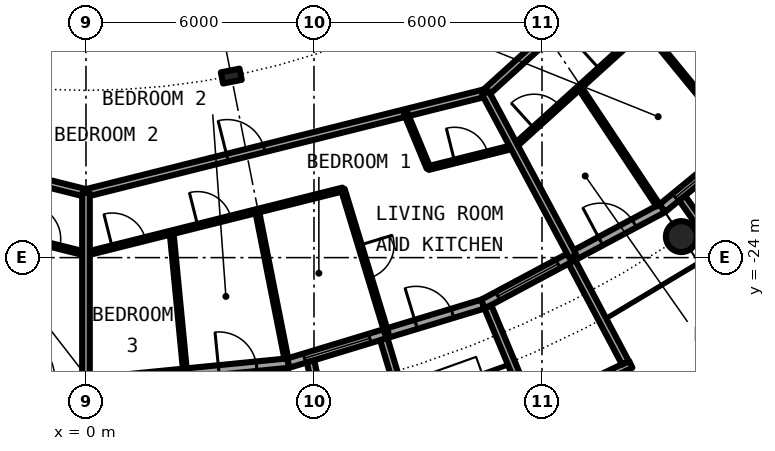
"""IFC4 building model, lengths in metres.
Left out: names, types, materials, properties, quantities, classifications, styles, units other than length and angle.
Written with IfcOpenShell. Run it as: python <this file> out.ifc"""

import sys

from ifc_helpers import new_model, si_unit, direction, frame, frame_2d, origin, origin_2d, place, context, subcontext, project, spatial, rectangle, circle, hollow_circle, i_section, extrude, element, fill, save


model = new_model("IFC4")
c1 = context("Model", 3, precision=1e-05, world=origin(), true_north=direction((0.0, 1.0)))
c2 = subcontext(c1, "Body", "Model", "MODEL_VIEW")
j1 = project(units=[si_unit("LENGTHUNIT", "METRE"), si_unit("PLANEANGLEUNIT", "RADIAN")], contexts=[c1])
p1 = place(None, origin())
s1 = spatial("IfcSite", under=j1, at=p1, CompositionType="ELEMENT")
p2 = place(p1, origin())
s2 = spatial("IfcBuilding", under=s1, at=p2, CompositionType="ELEMENT")
p3 = place(p2, frame((0.0, 0.0, 161.6)))
s3 = spatial("IfcBuildingStorey", under=s2, at=p3, CompositionType="ELEMENT", Elevation=161.6)
p4 = place(p3, frame((15.667, -23.448, 0.0), z_axis=(0.0, 0.0, 1.0), x_axis=(1.0, 0.0, 0.0)))
e1 = element("IfcColumn", 1, at=p4, inside=s3, PredefinedType="COLUMN", context=c2, shape_type="SweptSolid", body=[
    extrude(hollow_circle(Radius=0.406, WallThickness=0.04, at=origin_2d()), origin(), (0.0, 0.0, 1.0), 3.05),
])
p5 = place(p3, frame((3.824, -19.223, 0.0), z_axis=(0.0, 0.0, 1.0), x_axis=(0.195090322016, -0.980785280403, 0.0)))
e2 = element("IfcColumn", 2, at=p5, inside=s3, PredefinedType="COLUMN", context=c2, shape_type="SweptSolid", body=[
    extrude(i_section(OverallWidth=0.3, OverallDepth=0.5, WebThickness=0.014, FlangeThickness=0.028, FilletRadius=0.027, at=origin_2d()), origin(), (0.0, 0.0, 1.0), 3.05),
])
p6 = place(p3, frame((-5.326, -26.775, 0.0), z_axis=(0.0, 0.0, 1.0), x_axis=(0.995173996315, -0.098126026407, 0.0)))
e3 = element("IfcWall", 3, at=p6, inside=s3, PredefinedType="SOLIDWALL", context=c2, shape_type="SweptSolid", body=[
    extrude(rectangle(XDim=5.352, YDim=0.25, at=frame_2d((2.676, 0.0))), origin(), (0.0, 0.0, 1.0), 2.7),
])
p7 = place(p6, frame((0.441, 0.0, 0.3)))
e4 = element("IfcOpeningElement", 4, at=p7, cuts=e3, PredefinedType="OPENING", context=c2, shape_type="SweptSolid", body=[
    extrude(rectangle(XDim=1.8, YDim=2.1, at=frame_2d((0.9, 1.05))), frame((0.0, 0.135, 0.0), z_axis=(0.0, -1.0, 0.0), x_axis=(1.0, 0.0, 0.0)), (0.0, 0.0, 1.0), 0.27),
])
p8 = place(p6, frame((3.51, 0.0, 0.0)))
e5 = element("IfcOpeningElement", 5, at=p8, cuts=e3, PredefinedType="OPENING", context=c2, shape_type="SweptSolid", body=[
    extrude(rectangle(XDim=1.0, YDim=2.2, at=frame_2d((0.5, 1.1))), frame((0.0, 0.135, 0.0), z_axis=(0.0, -1.0, 0.0), x_axis=(1.0, 0.0, 0.0)), (0.0, 0.0, 1.0), 0.27),
])
p9 = place(p3, frame((0.0, -27.3, 0.0), z_axis=(0.0, 0.0, 1.0), x_axis=(0.995173996315, 0.098126026407, 0.0)))
e6 = element("IfcWall", 6, at=p9, inside=s3, PredefinedType="SOLIDWALL", context=c2, shape_type="SweptSolid", body=[
    extrude(rectangle(XDim=5.352, YDim=0.25, at=frame_2d((2.676, 0.0))), origin(), (0.0, 0.0, 1.0), 2.7),
])
p10 = place(p9, frame((0.441, 0.0, 0.3)))
e7 = element("IfcOpeningElement", 7, at=p10, cuts=e6, PredefinedType="OPENING", context=c2, shape_type="SweptSolid", body=[
    extrude(rectangle(XDim=1.8, YDim=2.1, at=frame_2d((0.9, 1.05))), frame((0.0, 0.135, 0.0), z_axis=(0.0, -1.0, 0.0), x_axis=(1.0, 0.0, 0.0)), (0.0, 0.0, 1.0), 0.27),
])
p11 = place(p9, frame((3.51, 0.0, 0.0)))
e8 = element("IfcOpeningElement", 8, at=p11, cuts=e6, PredefinedType="OPENING", context=c2, shape_type="SweptSolid", body=[
    extrude(rectangle(XDim=1.0, YDim=2.2, at=frame_2d((0.5, 1.1))), frame((0.0, 0.135, 0.0), z_axis=(0.0, -1.0, 0.0), x_axis=(1.0, 0.0, 0.0)), (0.0, 0.0, 1.0), 0.27),
])
p12 = place(p3, frame((5.326, -26.775, 0.0), z_axis=(0.0, 0.0, 1.0), x_axis=(0.956965678721, 0.290201119486, 0.0)))
e9 = element("IfcWall", 9, at=p12, inside=s3, PredefinedType="SOLIDWALL", context=c2, shape_type="SweptSolid", body=[
    extrude(rectangle(XDim=5.351, YDim=0.25, at=frame_2d((2.676, 0.0))), origin(), (0.0, 0.0, 1.0), 2.7),
])
p13 = place(p12, frame((0.441, 0.0, 0.3)))
e10 = element("IfcOpeningElement", 10, at=p13, cuts=e9, PredefinedType="OPENING", context=c2, shape_type="SweptSolid", body=[
    extrude(rectangle(XDim=1.8, YDim=2.1, at=frame_2d((0.9, 1.05))), frame((0.0, 0.135, 0.0), z_axis=(0.0, -1.0, 0.0), x_axis=(1.0, 0.0, 0.0)), (0.0, 0.0, 1.0), 0.27),
])
p14 = place(p12, frame((3.51, 0.0, 0.0)))
e11 = element("IfcOpeningElement", 11, at=p14, cuts=e9, PredefinedType="OPENING", context=c2, shape_type="SweptSolid", body=[
    extrude(rectangle(XDim=1.0, YDim=2.2, at=frame_2d((0.5, 1.1))), frame((0.0, 0.135, 0.0), z_axis=(0.0, -1.0, 0.0), x_axis=(1.0, 0.0, 0.0)), (0.0, 0.0, 1.0), 0.27),
])
p15 = place(p3, frame((5.909, -26.729, -0.03), z_axis=(0.0, 0.0, 1.0), x_axis=(0.216409053917, -0.976302781612, 0.0)))
e12 = element("IfcWall", 12, at=p15, inside=s3, PredefinedType="SOLIDWALL", context=c2, shape_type="SweptSolid", body=[
    extrude(rectangle(XDim=2.925, YDim=0.2, at=frame_2d((1.463, 0.0))), origin(), (0.0, 0.0, 1.0), 2.73),
])
p16 = place(p3, frame((7.837, -26.144, -0.03), z_axis=(0.0, 0.0, 1.0), x_axis=(0.287064767992, -0.957911174889, 0.0)))
e13 = element("IfcWall", 13, at=p16, inside=s3, PredefinedType="SOLIDWALL", context=c2, shape_type="SweptSolid", body=[
    extrude(rectangle(XDim=3.006, YDim=0.2, at=frame_2d((1.503, 0.0))), origin(), (0.0, 0.0, 1.0), 2.73),
])
p17 = place(p3, frame((10.447, -25.222, 0.0), z_axis=(0.0, 0.0, 1.0), x_axis=(0.881915646801, 0.471407246368, 0.0)))
e14 = element("IfcWall", 14, at=p17, inside=s3, PredefinedType="SOLIDWALL", context=c2, shape_type="SweptSolid", body=[
    extrude(rectangle(XDim=5.352, YDim=0.25, at=frame_2d((2.676, 0.0))), origin(), (0.0, 0.0, 1.0), 2.7),
])
p18 = place(p17, frame((0.441, 0.0, 0.3)))
e15 = element("IfcOpeningElement", 15, at=p18, cuts=e14, PredefinedType="OPENING", context=c2, shape_type="SweptSolid", body=[
    extrude(rectangle(XDim=1.8, YDim=2.1, at=frame_2d((0.9, 1.05))), frame((0.0, 0.135, 0.0), z_axis=(0.0, -1.0, 0.0), x_axis=(1.0, 0.0, 0.0)), (0.0, 0.0, 1.0), 0.27),
])
p19 = place(p17, frame((3.51, 0.0, 0.0)))
e16 = element("IfcOpeningElement", 16, at=p19, cuts=e14, PredefinedType="OPENING", context=c2, shape_type="SweptSolid", body=[
    extrude(rectangle(XDim=1.0, YDim=2.2, at=frame_2d((0.5, 1.1))), frame((0.0, 0.135, 0.0), z_axis=(0.0, -1.0, 0.0), x_axis=(1.0, 0.0, 0.0)), (0.0, 0.0, 1.0), 0.27),
])
p20 = place(p3, frame((11.629, -28.088, -0.03), z_axis=(0.0, 0.0, 1.0), x_axis=(0.904000060331, 0.427532327342, 0.0)))
e17 = element("IfcWall", 17, at=p20, inside=s3, PredefinedType="SOLIDWALL", context=c2, shape_type="SweptSolid", body=[
    extrude(rectangle(XDim=2.993, YDim=0.2, at=frame_2d((1.497, 0.0))), origin(), (0.0, 0.0, 1.0), 2.73),
])
p21 = place(p20, frame((0.457, 0.0, 0.33)))
e18 = element("IfcOpeningElement", 18, at=p21, cuts=e17, PredefinedType="OPENING", context=c2, shape_type="SweptSolid", body=[
    extrude(circle(Radius=1.04, at=frame_2d((1.04, 1.04))), frame((0.0, 0.11, 0.0), z_axis=(0.0, -1.0, 0.0), x_axis=(1.0, 0.0, 0.0)), (0.0, 0.0, 1.0), 0.22),
])
p22 = place(p3, frame((10.575, -25.295, -0.03), z_axis=(0.0, 0.0, 1.0), x_axis=(0.385697364644, -0.922625353492, 0.0)))
e19 = element("IfcWall", 19, at=p22, inside=s3, PredefinedType="SOLIDWALL", context=c2, shape_type="SweptSolid", body=[
    extrude(rectangle(XDim=2.883, YDim=0.2, at=frame_2d((1.442, 0.0))), origin(), (0.0, 0.0, 1.0), 2.73),
])
p23 = place(p3, frame((12.787, -24.113, -0.03), z_axis=(0.0, 0.0, 1.0), x_axis=(0.468365282436, -0.883534924159, 0.0)))
e20 = element("IfcWall", 20, at=p23, inside=s3, PredefinedType="SOLIDWALL", context=c2, shape_type="SweptSolid", body=[
    extrude(rectangle(XDim=3.006, YDim=0.2, at=frame_2d((1.503, 0.0))), origin(), (0.0, 0.0, 1.0), 2.73),
])
p24 = place(p3, frame((15.167, -22.699, 0.0), z_axis=(0.0, 0.0, 1.0), x_axis=(0.773019449054, 0.634382322723, 0.0)))
e21 = element("IfcWall", 21, at=p24, inside=s3, PredefinedType="SOLIDWALL", context=c2, shape_type="SweptSolid", body=[
    extrude(rectangle(XDim=5.352, YDim=0.25, at=frame_2d((2.676, 0.0))), origin(), (0.0, 0.0, 1.0), 2.7),
])
p25 = place(p24, frame((0.441, 0.0, 0.3)))
e22 = element("IfcOpeningElement", 22, at=p25, cuts=e21, PredefinedType="OPENING", context=c2, shape_type="SweptSolid", body=[
    extrude(rectangle(XDim=1.8, YDim=2.1, at=frame_2d((0.9, 1.05))), frame((0.0, 0.135, 0.0), z_axis=(0.0, -1.0, 0.0), x_axis=(1.0, 0.0, 0.0)), (0.0, 0.0, 1.0), 0.27),
])
p26 = place(p24, frame((3.51, 0.0, 0.0)))
e23 = element("IfcOpeningElement", 23, at=p26, cuts=e21, PredefinedType="OPENING", context=c2, shape_type="SweptSolid", body=[
    extrude(rectangle(XDim=1.0, YDim=2.2, at=frame_2d((0.5, 1.1))), frame((0.0, 0.135, 0.0), z_axis=(0.0, -1.0, 0.0), x_axis=(1.0, 0.0, 0.0)), (0.0, 0.0, 1.0), 0.27),
])
p27 = place(p3, frame((15.688, -22.433, -0.03), z_axis=(0.0, 0.0, 1.0), x_axis=(0.573260687834, -0.819373043115, 0.0)))
e24 = element("IfcWall", 24, at=p27, inside=s3, PredefinedType="SOLIDWALL", context=c2, shape_type="SweptSolid", body=[
    extrude(rectangle(XDim=2.925, YDim=0.2, at=frame_2d((1.463, 0.0))), origin(), (0.0, 0.0, 1.0), 2.73),
])
p28 = place(p3, frame((-6.762, -22.206, 0.0), z_axis=(0.0, 0.0, 1.0), x_axis=(0.97002908491, -0.242988836015, 0.0)))
e25 = element("IfcWall", 25, at=p28, inside=s3, PredefinedType="PARTITIONING", context=c2, shape_type="SweptSolid", body=[
    extrude(rectangle(XDim=6.971, YDim=0.1, at=frame_2d((3.485, 0.0))), origin(), (0.0, 0.0, 1.0), 2.7),
])
p29 = place(p28, frame((3.039, 0.0, 0.0)))
e26 = element("IfcOpeningElement", 26, at=p29, cuts=e25, PredefinedType="OPENING", context=c2, shape_type="SweptSolid", body=[
    extrude(rectangle(XDim=0.9, YDim=2.3, at=frame_2d((0.45, 1.15))), frame((0.0, 0.06, 0.0), z_axis=(0.0, -1.0, 0.0), x_axis=(1.0, 0.0, 0.0)), (0.0, 0.0, 1.0), 0.12),
])
p30 = place(p28, frame((5.358, 0.0, 0.0)))
e27 = element("IfcOpeningElement", 27, at=p30, cuts=e25, PredefinedType="OPENING", context=c2, shape_type="SweptSolid", body=[
    extrude(rectangle(XDim=0.9, YDim=2.3, at=frame_2d((0.45, 1.15))), frame((0.0, 0.06, 0.0), z_axis=(0.0, -1.0, 0.0), x_axis=(1.0, 0.0, 0.0)), (0.0, 0.0, 1.0), 0.12),
])
p31 = place(p3, frame((0.0, -23.9, 0.0), z_axis=(0.0, 0.0, 1.0), x_axis=(0.97002908491, 0.242988836015, 0.0)))
e28 = element("IfcWall", 28, at=p31, inside=s3, PredefinedType="PARTITIONING", context=c2, shape_type="SweptSolid", body=[
    extrude(rectangle(XDim=6.971, YDim=0.1, at=frame_2d((3.485, 0.0))), origin(), (0.0, 0.0, 1.0), 2.7),
])
p32 = place(p31, frame((3.032, 0.0, 0.0)))
e29 = element("IfcOpeningElement", 29, at=p32, cuts=e28, PredefinedType="OPENING", context=c2, shape_type="SweptSolid", body=[
    extrude(rectangle(XDim=0.9, YDim=2.3, at=frame_2d((0.45, 1.15))), frame((0.0, 0.06, 0.0), z_axis=(0.0, -1.0, 0.0), x_axis=(1.0, 0.0, 0.0)), (0.0, 0.0, 1.0), 0.12),
])
p33 = place(p31, frame((0.712, 0.0, 0.0)))
e30 = element("IfcOpeningElement", 30, at=p33, cuts=e28, PredefinedType="OPENING", context=c2, shape_type="SweptSolid", body=[
    extrude(rectangle(XDim=0.9, YDim=2.3, at=frame_2d((0.45, 1.15))), frame((0.0, 0.06, 0.0), z_axis=(0.0, -1.0, 0.0), x_axis=(1.0, 0.0, 0.0)), (0.0, 0.0, 1.0), 0.12),
])
p34 = place(p3, frame((9.012, -21.643, 0.0), z_axis=(0.0, 0.0, 1.0), x_axis=(0.970025067561, 0.243004873001, 0.0)))
e31 = element("IfcWall", 31, at=p34, inside=s3, PredefinedType="PARTITIONING", context=c2, shape_type="SweptSolid", body=[
    extrude(rectangle(XDim=2.326, YDim=0.1, at=frame_2d((1.163, 0.0))), origin(), (0.0, 0.0, 1.0), 2.7),
])
p35 = place(p34, frame((0.71, 0.0, 0.0)))
e32 = element("IfcOpeningElement", 32, at=p35, cuts=e31, PredefinedType="OPENING", context=c2, shape_type="SweptSolid", body=[
    extrude(rectangle(XDim=0.9, YDim=2.3, at=frame_2d((0.45, 1.15))), frame((0.0, 0.06, 0.0), z_axis=(0.0, -1.0, 0.0), x_axis=(1.0, 0.0, 0.0)), (0.0, 0.0, 1.0), 0.12),
])
p36 = place(p3, frame((11.266, -21.078, 0.0), z_axis=(0.0, 0.0, 1.0), x_axis=(0.74114118713, 0.671349194339, 0.0)))
e33 = element("IfcWall", 33, at=p36, inside=s3, PredefinedType="PARTITIONING", context=c2, shape_type="SweptSolid", body=[
    extrude(rectangle(XDim=6.965, YDim=0.1, at=frame_2d((3.482, 0.0))), origin(), (0.0, 0.0, 1.0), 2.7),
])
p37 = place(p36, frame((3.034, 0.0, 0.0)))
e34 = element("IfcOpeningElement", 34, at=p37, cuts=e33, PredefinedType="OPENING", context=c2, shape_type="SweptSolid", body=[
    extrude(rectangle(XDim=0.9, YDim=2.3, at=frame_2d((0.45, 1.15))), frame((0.0, 0.06, 0.0), z_axis=(0.0, -1.0, 0.0), x_axis=(1.0, 0.0, 0.0)), (0.0, 0.0, 1.0), 0.12),
])
p38 = place(p36, frame((0.712, 0.0, 0.0)))
e35 = element("IfcOpeningElement", 35, at=p38, cuts=e33, PredefinedType="OPENING", context=c2, shape_type="SweptSolid", body=[
    extrude(rectangle(XDim=0.9, YDim=2.3, at=frame_2d((0.45, 1.15))), frame((0.0, 0.06, 0.0), z_axis=(0.0, -1.0, 0.0), x_axis=(1.0, 0.0, 0.0)), (0.0, 0.0, 1.0), 0.12),
])
p39 = place(p3, frame((-10.518, -19.665, 0.0), z_axis=(0.0, 0.0, 1.0), x_axis=(0.970023181991, -0.243012399685, 0.0)))
e36 = element("IfcWall", 36, at=p39, inside=s3, PredefinedType="PARTITIONING", context=c2, shape_type="SweptSolid", body=[
    extrude(rectangle(XDim=10.843, YDim=0.2, at=frame_2d((5.421, 0.0))), origin(), (0.0, 0.0, 1.0), 2.7),
])
p40 = place(p39, frame((6.008, 0.0, 0.0)))
e37 = element("IfcOpeningElement", 37, at=p40, cuts=e36, PredefinedType="OPENING", context=c2, shape_type="SweptSolid", body=[
    extrude(rectangle(XDim=1.0, YDim=2.3, at=frame_2d((0.5, 1.15))), frame((0.0, 0.11, 0.0), z_axis=(0.0, -1.0, 0.0), x_axis=(1.0, 0.0, 0.0)), (0.0, 0.0, 1.0), 0.22),
])
p41 = place(p3, frame((0.0, -22.3, 0.0), z_axis=(0.0, 0.0, 1.0), x_axis=(0.970023181991, 0.243012399685, 0.0)))
e38 = element("IfcWall", 38, at=p41, inside=s3, PredefinedType="PARTITIONING", context=c2, shape_type="SweptSolid", body=[
    extrude(rectangle(XDim=10.843, YDim=0.2, at=frame_2d((5.421, 0.0))), origin(), (0.0, 0.0, 1.0), 2.7),
])
p42 = place(p41, frame((3.835, 0.0, 0.0)))
e39 = element("IfcOpeningElement", 39, at=p42, cuts=e38, PredefinedType="OPENING", context=c2, shape_type="SweptSolid", body=[
    extrude(rectangle(XDim=1.0, YDim=2.3, at=frame_2d((0.5, 1.15))), frame((0.0, 0.11, 0.0), z_axis=(0.0, -1.0, 0.0), x_axis=(1.0, 0.0, 0.0)), (0.0, 0.0, 1.0), 0.22),
])
p43 = place(p3, frame((10.512, -19.667, 0.0), z_axis=(0.0, 0.0, 1.0), x_axis=(0.740947367223, 0.671563101283, 0.0)))
e40 = element("IfcWall", 40, at=p43, inside=s3, PredefinedType="PARTITIONING", context=c2, shape_type="SweptSolid", body=[
    extrude(rectangle(XDim=10.837, YDim=0.2, at=frame_2d((5.419, 0.0))), origin(), (0.0, 0.0, 1.0), 2.7),
])
p44 = place(p43, frame((3.835, 0.0, 0.0)))
e41 = element("IfcOpeningElement", 41, at=p44, cuts=e40, PredefinedType="OPENING", context=c2, shape_type="SweptSolid", body=[
    extrude(rectangle(XDim=1.0, YDim=2.3, at=frame_2d((0.5, 1.15))), frame((0.0, 0.11, 0.0), z_axis=(0.0, -1.0, 0.0), x_axis=(1.0, 0.0, 0.0)), (0.0, 0.0, 1.0), 0.22),
])
p45 = place(p3, frame((0.0, -27.175, 0.0), z_axis=(0.0, 0.0, 1.0), x_axis=(0.0, 1.0, 0.0)))
e42 = element("IfcWall", 42, at=p45, inside=s3, PredefinedType="PARTITIONING", context=c2, shape_type="SweptSolid", body=[
    extrude(rectangle(XDim=4.875, YDim=0.2, at=frame_2d((2.438, 0.0))), origin(), (0.0, 0.0, 1.0), 2.7),
])
p46 = place(p3, frame((2.253, -23.336, 0.0), z_axis=(0.0, 0.0, 1.0), x_axis=(0.09626981452, -0.995355274669, 0.0)))
e43 = element("IfcWall", 43, at=p46, inside=s3, PredefinedType="PARTITIONING", context=c2, shape_type="SweptSolid", body=[
    extrude(rectangle(XDim=3.73, YDim=0.1, at=frame_2d((1.865, 0.0))), origin(), (0.0, 0.0, 1.0), 2.7),
])
p47 = place(p3, frame((4.503, -22.772, 0.0), z_axis=(0.0, 0.0, 1.0), x_axis=(0.194089507313, -0.980983824103, 0.0)))
e44 = element("IfcWall", 44, at=p47, inside=s3, PredefinedType="PARTITIONING", context=c2, shape_type="SweptSolid", body=[
    extrude(rectangle(XDim=3.962, YDim=0.1, at=frame_2d((1.981, 0.0))), origin(), (0.0, 0.0, 1.0), 2.7),
])
p48 = place(p3, frame((6.76, -22.207, 0.0), z_axis=(0.0, 0.0, 1.0), x_axis=(0.291291575636, -0.956634317785, 0.0)))
e45 = element("IfcWall", 45, at=p48, inside=s3, PredefinedType="PARTITIONING", context=c2, shape_type="SweptSolid", body=[
    extrude(rectangle(XDim=3.962, YDim=0.1, at=frame_2d((1.981, 0.0))), origin(), (0.0, 0.0, 1.0), 2.7),
])
p49 = place(p48, frame((1.531, 0.0, 0.0)))
e46 = element("IfcOpeningElement", 46, at=p49, cuts=e45, PredefinedType="OPENING", context=c2, shape_type="SweptSolid", body=[
    extrude(rectangle(XDim=0.9, YDim=2.3, at=frame_2d((0.45, 1.15))), frame((0.0, 0.06, 0.0), z_axis=(0.0, -1.0, 0.0), x_axis=(1.0, 0.0, 0.0)), (0.0, 0.0, 1.0), 0.12),
])
p50 = place(p3, frame((10.512, -19.667, 0.0), z_axis=(0.0, 0.0, 1.0), x_axis=(0.471427642527, -0.881904744211, 0.0)))
e47 = element("IfcWall", 47, at=p50, inside=s3, PredefinedType="PARTITIONING", context=c2, shape_type="SweptSolid", body=[
    extrude(rectangle(XDim=4.875, YDim=0.2, at=frame_2d((2.438, 0.0))), origin(), (0.0, 0.0, 1.0), 2.7),
])
p51 = place(p3, frame((12.988, -19.518, 0.0), z_axis=(0.0, 0.0, 1.0), x_axis=(0.553823887887, -0.83263383381, 0.0)))
e48 = element("IfcWall", 48, at=p51, inside=s3, PredefinedType="PARTITIONING", context=c2, shape_type="SweptSolid", body=[
    extrude(rectangle(XDim=3.73, YDim=0.1, at=frame_2d((1.865, 0.0))), origin(), (0.0, 0.0, 1.0), 2.7),
])
p52 = place(p3, frame((14.706, -17.961, 0.0), z_axis=(0.0, 0.0, 1.0), x_axis=(0.633590098448, -0.773668913133, 0.0)))
e49 = element("IfcWall", 49, at=p52, inside=s3, PredefinedType="PARTITIONING", context=c2, shape_type="SweptSolid", body=[
    extrude(rectangle(XDim=3.962, YDim=0.1, at=frame_2d((1.981, 0.0))), origin(), (0.0, 0.0, 1.0), 2.7),
])
p53 = place(p3, frame((8.41, -20.193, 0.0), z_axis=(0.0, 0.0, 1.0), x_axis=(0.384228756538, -0.923237923099, 0.0)))
e50 = element("IfcWall", 50, at=p53, inside=s3, PredefinedType="PARTITIONING", context=c2, shape_type="SweptSolid", body=[
    extrude(rectangle(XDim=1.569, YDim=0.1, at=frame_2d((0.785, 0.0))), origin(), (0.0, 0.0, 1.0), 2.7),
])
p54 = place(p11, origin())
e51 = element("IfcDoor", 51, at=p54, inside=s3, OperationType="SINGLE_SWING_LEFT", PredefinedType="DOOR", context=c2, shape_type="SweptSolid", body=[
    extrude(rectangle(XDim=1.0, YDim=2.2, at=frame_2d((0.5, 1.1))), frame((0.0, 0.025, 0.0), z_axis=(0.0, -1.0, 0.0), x_axis=(1.0, 0.0, 0.0)), (0.0, 0.0, 1.0), 0.05),
])
fill(e8, e51)
p55 = place(p13, origin())
e52 = element("IfcWindow", 52, at=p55, inside=s3, PartitioningType="SINGLE_PANEL", PredefinedType="WINDOW", context=c2, shape_type="SweptSolid", body=[
    extrude(rectangle(XDim=1.8, YDim=2.1, at=frame_2d((0.9, 1.05))), frame((0.0, 0.03, 0.0), z_axis=(0.0, -1.0, 0.0), x_axis=(1.0, 0.0, 0.0)), (0.0, 0.0, 1.0), 0.06),
])
fill(e10, e52)
p56 = place(p14, origin())
e53 = element("IfcDoor", 53, at=p56, inside=s3, OperationType="SINGLE_SWING_LEFT", PredefinedType="DOOR", context=c2, shape_type="SweptSolid", body=[
    extrude(rectangle(XDim=1.0, YDim=2.2, at=frame_2d((0.5, 1.1))), frame((0.0, 0.025, 0.0), z_axis=(0.0, -1.0, 0.0), x_axis=(1.0, 0.0, 0.0)), (0.0, 0.0, 1.0), 0.05),
])
fill(e11, e53)
p57 = place(p18, origin())
e54 = element("IfcWindow", 54, at=p57, inside=s3, PartitioningType="SINGLE_PANEL", PredefinedType="WINDOW", context=c2, shape_type="SweptSolid", body=[
    extrude(rectangle(XDim=1.8, YDim=2.1, at=frame_2d((0.9, 1.05))), frame((0.0, 0.03, 0.0), z_axis=(0.0, -1.0, 0.0), x_axis=(1.0, 0.0, 0.0)), (0.0, 0.0, 1.0), 0.06),
])
fill(e15, e54)
p58 = place(p21, origin())
e55 = element("IfcWindow", 55, at=p58, inside=s3, PartitioningType="SINGLE_PANEL", PredefinedType="WINDOW", context=c2, shape_type="SweptSolid", body=[
    extrude(circle(Radius=1.04, at=frame_2d((1.04, 1.04))), frame((0.0, 0.03, 0.0), z_axis=(0.0, -1.0, 0.0), x_axis=(1.0, 0.0, 0.0)), (0.0, 0.0, 1.0), 0.06),
])
fill(e18, e55)
p59 = place(p19, origin())
e56 = element("IfcDoor", 56, at=p59, inside=s3, OperationType="SINGLE_SWING_LEFT", PredefinedType="DOOR", context=c2, shape_type="SweptSolid", body=[
    extrude(rectangle(XDim=1.0, YDim=2.2, at=frame_2d((0.5, 1.1))), frame((0.0, 0.025, 0.0), z_axis=(0.0, -1.0, 0.0), x_axis=(1.0, 0.0, 0.0)), (0.0, 0.0, 1.0), 0.05),
])
fill(e16, e56)
p60 = place(p25, origin())
e57 = element("IfcWindow", 57, at=p60, inside=s3, PartitioningType="SINGLE_PANEL", PredefinedType="WINDOW", context=c2, shape_type="SweptSolid", body=[
    extrude(rectangle(XDim=1.8, YDim=2.1, at=frame_2d((0.9, 1.05))), frame((0.0, 0.03, 0.0), z_axis=(0.0, -1.0, 0.0), x_axis=(1.0, 0.0, 0.0)), (0.0, 0.0, 1.0), 0.06),
])
fill(e22, e57)
p61 = place(p30, origin())
e58 = element("IfcDoor", 58, at=p61, inside=s3, OperationType="SINGLE_SWING_RIGHT", PredefinedType="DOOR", context=c2, shape_type="SweptSolid", body=[
    extrude(rectangle(XDim=0.9, YDim=2.3, at=frame_2d((0.45, 1.15))), frame((0.0, 0.025, 0.0), z_axis=(0.0, -1.0, 0.0), x_axis=(1.0, 0.0, 0.0)), (0.0, 0.0, 1.0), 0.05),
])
fill(e27, e58)
p62 = place(p42, origin())
e59 = element("IfcDoor", 59, at=p62, inside=s3, OperationType="SINGLE_SWING_LEFT", PredefinedType="DOOR", context=c2, shape_type="SweptSolid", body=[
    extrude(rectangle(XDim=1.0, YDim=2.3, at=frame_2d((0.5, 1.15))), frame((0.0, 0.025, 0.0), z_axis=(0.0, -1.0, 0.0), x_axis=(1.0, 0.0, 0.0)), (0.0, 0.0, 1.0), 0.05),
])
fill(e39, e59)
p63 = place(p35, origin())
e60 = element("IfcDoor", 60, at=p63, inside=s3, OperationType="SINGLE_SWING_LEFT", PredefinedType="DOOR", context=c2, shape_type="SweptSolid", body=[
    extrude(rectangle(XDim=0.9, YDim=2.3, at=frame_2d((0.45, 1.15))), frame((0.0, 0.025, 0.0), z_axis=(0.0, -1.0, 0.0), x_axis=(1.0, 0.0, 0.0)), (0.0, 0.0, 1.0), 0.05),
])
fill(e32, e60)
p64 = place(p49, origin())
e61 = element("IfcDoor", 61, at=p64, inside=s3, OperationType="SINGLE_SWING_RIGHT", PredefinedType="DOOR", context=c2, shape_type="SweptSolid", body=[
    extrude(rectangle(XDim=0.9, YDim=2.3, at=frame_2d((0.45, 1.15))), frame((0.0, 0.025, 0.0), z_axis=(0.0, -1.0, 0.0), x_axis=(1.0, 0.0, 0.0)), (0.0, 0.0, 1.0), 0.05),
])
fill(e46, e61)
p65 = place(p32, origin())
e62 = element("IfcDoor", 62, at=p65, inside=s3, OperationType="SINGLE_SWING_LEFT", PredefinedType="DOOR", context=c2, shape_type="SweptSolid", body=[
    extrude(rectangle(XDim=0.9, YDim=2.3, at=frame_2d((0.45, 1.15))), frame((0.0, 0.025, 0.0), z_axis=(0.0, -1.0, 0.0), x_axis=(1.0, 0.0, 0.0)), (0.0, 0.0, 1.0), 0.05),
])
fill(e29, e62)
p66 = place(p33, origin())
e63 = element("IfcDoor", 63, at=p66, inside=s3, OperationType="SINGLE_SWING_LEFT", PredefinedType="DOOR", context=c2, shape_type="SweptSolid", body=[
    extrude(rectangle(XDim=0.9, YDim=2.3, at=frame_2d((0.45, 1.15))), frame((0.0, 0.025, 0.0), z_axis=(0.0, -1.0, 0.0), x_axis=(1.0, 0.0, 0.0)), (0.0, 0.0, 1.0), 0.05),
])
fill(e30, e63)
p67 = place(p37, origin())
e64 = element("IfcDoor", 64, at=p67, inside=s3, OperationType="SINGLE_SWING_RIGHT", PredefinedType="DOOR", context=c2, shape_type="SweptSolid", body=[
    extrude(rectangle(XDim=0.9, YDim=2.3, at=frame_2d((0.45, 1.15))), frame((0.0, 0.025, 0.0), z_axis=(0.0, -1.0, 0.0), x_axis=(1.0, 0.0, 0.0)), (0.0, 0.0, 1.0), 0.05),
])
fill(e34, e64)
p68 = place(p38, origin())
e65 = element("IfcDoor", 65, at=p68, inside=s3, OperationType="SINGLE_SWING_LEFT", PredefinedType="DOOR", context=c2, shape_type="SweptSolid", body=[
    extrude(rectangle(XDim=0.9, YDim=2.3, at=frame_2d((0.45, 1.15))), frame((0.0, 0.025, 0.0), z_axis=(0.0, -1.0, 0.0), x_axis=(1.0, 0.0, 0.0)), (0.0, 0.0, 1.0), 0.05),
])
fill(e35, e65)
save(model, sys.argv[1])
